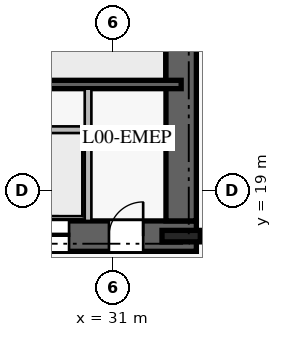
"""IFC4 building model, lengths in metres.
Left out: names, types, materials, properties, quantities, classifications, styles, units other than length and angle.
Written with IfcOpenShell. Run it as: python <this file> out.ifc"""

import sys

from ifc_helpers import new_model, si_unit, direction, frame, frame_2d, origin, origin_2d, place, context, subcontext, project, spatial, rectangle, i_section, extrude, element, fill, save


model = new_model("IFC4")
c1 = context("Model", 3, precision=1e-05, world=origin(), true_north=direction((0.0, 1.0)))
c2 = subcontext(c1, "Body", "Model", "MODEL_VIEW")
j1 = project(units=[si_unit("LENGTHUNIT", "METRE"), si_unit("PLANEANGLEUNIT", "RADIAN")], contexts=[c1])
p1 = place(None, origin())
s1 = spatial("IfcSite", under=j1, at=p1, CompositionType="ELEMENT")
p2 = place(p1, origin())
s2 = spatial("IfcBuilding", under=s1, at=p2, CompositionType="ELEMENT")
p3 = place(p2, origin())
s3 = spatial("IfcBuildingStorey", under=s2, at=p3, CompositionType="ELEMENT", Elevation=0.0)
p4 = place(p3, frame((16.8, 17.8, 0.0), z_axis=(0.0, 0.0, 1.0), x_axis=(1.0, 0.0, 0.0)))
e1 = element("IfcWall", 1, at=p4, inside=s3, PredefinedType="SHEAR", context=c2, shape_type="SweptSolid", body=[
    extrude(rectangle(XDim=16.4, YDim=0.8, at=frame_2d((8.2, 0.0))), origin(), (0.0, 0.0, 1.0), 4.94),
])
p5 = place(p4, frame((5.15, 0.0, 0.0)))
e2 = element("IfcOpeningElement", 2, at=p5, cuts=e1, PredefinedType="OPENING", context=c2, shape_type="SweptSolid", body=[
    extrude(rectangle(XDim=1.2, YDim=2.25, at=frame_2d((0.6, 1.125))), frame((0.0, 0.41, 0.0), z_axis=(0.0, -1.0, 0.0), x_axis=(1.0, 0.0, 0.0)), (0.0, 0.0, 1.0), 0.82),
])
p6 = place(p4, frame((14.1, 0.0, 0.0)))
e3 = element("IfcOpeningElement", 3, at=p6, cuts=e1, PredefinedType="OPENING", context=c2, shape_type="SweptSolid", body=[
    extrude(rectangle(XDim=0.9, YDim=2.1, at=frame_2d((0.45, 1.05))), frame((0.0, 0.41, 0.0), z_axis=(0.0, -1.0, 0.0), x_axis=(1.0, 0.0, 0.0)), (0.0, 0.0, 1.0), 0.82),
])
p7 = place(p4, frame((8.0, 0.0, 0.0)))
e4 = element("IfcOpeningElement", 4, at=p7, cuts=e1, PredefinedType="OPENING", context=c2, shape_type="SweptSolid", body=[
    extrude(rectangle(XDim=1.1, YDim=2.2, at=frame_2d((0.55, 1.1))), frame((0.0, 0.41, 0.0), z_axis=(0.0, -1.0, 0.0), x_axis=(1.0, 0.0, 0.0)), (0.0, 0.0, 1.0), 0.82),
])
p8 = place(p4, frame((9.975, 0.0, 0.0)))
e5 = element("IfcOpeningElement", 5, at=p8, cuts=e1, PredefinedType="OPENING", context=c2, shape_type="SweptSolid", body=[
    extrude(rectangle(XDim=1.1, YDim=2.2, at=frame_2d((0.55, 1.1))), frame((0.0, 0.41, 0.0), z_axis=(0.0, -1.0, 0.0), x_axis=(1.0, 0.0, 0.0)), (0.0, 0.0, 1.0), 0.82),
])
p9 = place(p4, frame((11.95, 0.0, 0.0)))
e6 = element("IfcOpeningElement", 6, at=p9, cuts=e1, PredefinedType="OPENING", context=c2, shape_type="SweptSolid", body=[
    extrude(rectangle(XDim=1.1, YDim=2.2, at=frame_2d((0.55, 1.1))), frame((0.0, 0.41, 0.0), z_axis=(0.0, -1.0, 0.0), x_axis=(1.0, 0.0, 0.0)), (0.0, 0.0, 1.0), 0.82),
])
p10 = place(p3, frame((32.8, 18.2, 0.0), z_axis=(0.0, 0.0, 1.0), x_axis=(0.0, 1.0, 0.0)))
e7 = element("IfcWall", 7, at=p10, inside=s3, PredefinedType="SHEAR", context=c2, shape_type="SweptSolid", body=[
    extrude(rectangle(XDim=13.6, YDim=0.8, at=frame_2d((6.8, 0.0))), origin(), (0.0, 0.0, 1.0), 4.94),
])
p11 = place(p3, frame((32.8, 17.8, 0.0), z_axis=(0.0, 0.0, 1.0), x_axis=(1.0, 0.0, 0.0)))
e8 = element("IfcColumn", 8, at=p11, inside=s3, PredefinedType="COLUMN", context=c2, shape_type="SweptSolid", body=[
    extrude(i_section(OverallWidth=0.302, OverallDepth=1.008, WebThickness=0.021, FlangeThickness=0.04, at=origin_2d()), origin(), (0.0, 0.0, 1.0), 5.2),
])
p12 = place(p3, frame((29.08, 21.79, 0.0), z_axis=(0.0, 0.0, 1.0), x_axis=(1.0, 0.0, 0.0)))
e9 = element("IfcWall", 9, at=p12, inside=s3, PredefinedType="SOLIDWALL", context=c2, shape_type="SweptSolid", body=[
    extrude(rectangle(XDim=3.72, YDim=0.22, at=frame_2d((1.86, 0.0))), origin(), (0.0, 0.0, 1.0), 4.94),
])
p13 = place(p3, frame((30.35, 18.2, 0.0), z_axis=(0.0, 0.0, 1.0), x_axis=(0.0, 1.0, 0.0)))
e10 = element("IfcWall", 10, at=p13, inside=s3, PredefinedType="PARTITIONING", context=c2, shape_type="SweptSolid", body=[
    extrude(rectangle(XDim=3.48, YDim=0.175, at=frame_2d((1.74, 0.0))), origin(), (0.0, 0.0, 1.0), 4.94),
])
p14 = place(p3, frame((28.35, 20.6, 0.0), z_axis=(0.0, 0.0, 1.0), x_axis=(1.0, 0.0, 0.0)))
e11 = element("IfcWall", 11, at=p14, inside=s3, PredefinedType="PARTITIONING", context=c2, shape_type="SweptSolid", body=[
    extrude(rectangle(XDim=1.9, YDim=0.175, at=frame_2d((0.95, 0.0))), origin(), (0.0, 0.0, 1.0), 4.94),
])
p15 = place(p6, origin())
e12 = element("IfcDoor", 12, at=p15, inside=s3, OperationType="SINGLE_SWING_RIGHT", PredefinedType="DOOR", context=c2, shape_type="SweptSolid", body=[
    extrude(rectangle(XDim=0.9, YDim=2.1, at=frame_2d((0.45, 1.05))), frame((0.0, 0.025, 0.0), z_axis=(0.0, -1.0, 0.0), x_axis=(1.0, 0.0, 0.0)), (0.0, 0.0, 1.0), 0.05),
])
fill(e3, e12)
p16 = place(p9, origin())
e13 = element("IfcDoor", 13, at=p16, inside=s3, OperationType="DOUBLE_DOOR_SLIDING", PredefinedType="DOOR", context=c2, shape_type="SweptSolid", body=[
    extrude(rectangle(XDim=1.1, YDim=2.2, at=frame_2d((0.55, 1.1))), frame((0.0, 0.025, 0.0), z_axis=(0.0, -1.0, 0.0), x_axis=(1.0, 0.0, 0.0)), (0.0, 0.0, 1.0), 0.05),
])
fill(e6, e13)
save(model, sys.argv[1])
